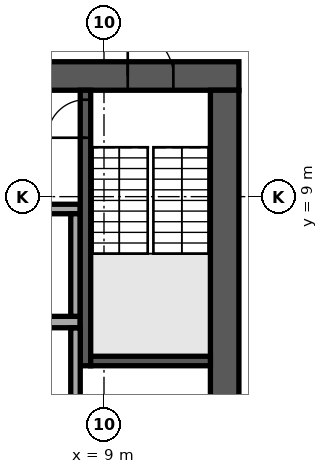
"""IFC4 building model, lengths in metres.
Left out: names, types, materials, properties, quantities, classifications, styles, units other than length and angle.
Written with IfcOpenShell. Run it as: python <this file> out.ifc"""

import sys

from ifc_helpers import new_model, si_unit, direction, frame, frame_2d, origin, place, context, subcontext, project, spatial, rectangle, extrude, element, fill, save


model = new_model("IFC4")
c1 = context("Model", 3, precision=1e-05, world=origin(), true_north=direction((0.0, 1.0)))
c2 = subcontext(c1, "Body", "Model", "MODEL_VIEW")
j1 = project(units=[si_unit("LENGTHUNIT", "METRE"), si_unit("PLANEANGLEUNIT", "RADIAN")], contexts=[c1])
p1 = place(None, origin())
s1 = spatial("IfcSite", under=j1, at=p1, CompositionType="ELEMENT")
p2 = place(p1, origin())
s2 = spatial("IfcBuilding", under=s1, at=p2, CompositionType="ELEMENT")
p3 = place(p2, frame((0.0, 0.0, 246.9)))
s3 = spatial("IfcBuildingStorey", under=s2, at=p3, CompositionType="ELEMENT", Elevation=246.9)
p4 = place(p3, frame((-12.55, 12.175, 0.0), z_axis=(0.0, 0.0, 1.0), x_axis=(1.0, 0.0, 0.0)))
e1 = element("IfcWall", 1, at=p4, inside=s3, PredefinedType="SHEAR", context=c2, shape_type="SweptSolid", body=[
    extrude(rectangle(XDim=25.1, YDim=0.75, at=frame_2d((12.55, 0.0))), origin(), (0.0, 0.0, 1.0), 3.64),
])
p5 = place(p4, frame((11.35, 0.0, 0.0)))
e2 = element("IfcOpeningElement", 2, at=p5, cuts=e1, PredefinedType="OPENING", context=c2, shape_type="SweptSolid", body=[
    extrude(rectangle(XDim=2.4, YDim=2.4, at=frame_2d((1.2, 1.2))), frame((0.0, 0.385, 0.0), z_axis=(0.0, -1.0, 0.0), x_axis=(1.0, 0.0, 0.0)), (0.0, 0.0, 1.0), 0.77),
])
p6 = place(p4, frame((22.175, 0.0, 0.0)))
e3 = element("IfcOpeningElement", 3, at=p6, cuts=e1, PredefinedType="OPENING", context=c2, shape_type="SweptSolid", body=[
    extrude(rectangle(XDim=1.2, YDim=2.1, at=frame_2d((0.6, 1.05))), frame((0.0, 0.385, 0.0), z_axis=(0.0, -1.0, 0.0), x_axis=(1.0, 0.0, 0.0)), (0.0, 0.0, 1.0), 0.77),
])
p7 = place(p4, frame((1.15, 0.0, 0.0)))
e4 = element("IfcOpeningElement", 4, at=p7, cuts=e1, PredefinedType="OPENING", context=c2, shape_type="SweptSolid", body=[
    extrude(rectangle(XDim=1.0, YDim=2.1, at=frame_2d((0.5, 1.05))), frame((0.0, 0.385, 0.0), z_axis=(0.0, -1.0, 0.0), x_axis=(1.0, 0.0, 0.0)), (0.0, 0.0, 1.0), 0.77),
])
p8 = place(p3, frame((12.175, -11.8, 0.0), z_axis=(0.0, 0.0, 1.0), x_axis=(0.0, 1.0, 0.0)))
e5 = element("IfcWall", 5, at=p8, inside=s3, PredefinedType="SHEAR", context=c2, shape_type="SweptSolid", body=[
    extrude(rectangle(XDim=23.6, YDim=0.75, at=frame_2d((11.8, 0.0))), origin(), (0.0, 0.0, 1.0), 3.64),
])
p9 = place(p8, frame((10.6, 0.0, 0.0)))
e6 = element("IfcOpeningElement", 6, at=p9, cuts=e5, PredefinedType="OPENING", context=c2, shape_type="SweptSolid", body=[
    extrude(rectangle(XDim=2.4, YDim=2.4, at=frame_2d((1.2, 1.2))), frame((0.0, 0.385, 0.0), z_axis=(0.0, -1.0, 0.0), x_axis=(1.0, 0.0, 0.0)), (0.0, 0.0, 1.0), 0.77),
])
p10 = place(p3, frame((-8.375, 5.7, 0.0), z_axis=(0.0, 0.0, 1.0), x_axis=(1.0, 0.0, 0.0)))
e7 = element("IfcWall", 7, at=p10, inside=s3, PredefinedType="SOLIDWALL", context=c2, shape_type="SweptSolid", body=[
    extrude(rectangle(XDim=16.75, YDim=0.3, at=frame_2d((8.375, 0.0))), origin(), (0.0, 0.0, 1.0), 3.64),
])
p11 = place(p3, frame((-8.375, 8.675, 0.0), z_axis=(0.0, 0.0, 1.0), x_axis=(1.0, 0.0, 0.0)))
e8 = element("IfcWall", 8, at=p11, inside=s3, PredefinedType="SOLIDWALL", context=c2, shape_type="SweptSolid", body=[
    extrude(rectangle(XDim=16.75, YDim=0.25, at=frame_2d((8.375, 0.0))), origin(), (0.0, 0.0, 1.0), 3.64),
])
p12 = place(p11, frame((0.9, 0.0, 0.0)))
e9 = element("IfcOpeningElement", 9, at=p12, cuts=e8, PredefinedType="OPENING", context=c2, shape_type="SweptSolid", body=[
    extrude(rectangle(XDim=1.2, YDim=2.1, at=frame_2d((0.6, 1.05))), frame((0.0, 0.135, 0.0), z_axis=(0.0, -1.0, 0.0), x_axis=(1.0, 0.0, 0.0)), (0.0, 0.0, 1.0), 0.27),
])
p13 = place(p11, frame((3.65, 0.0, 0.0)))
e10 = element("IfcOpeningElement", 10, at=p13, cuts=e8, PredefinedType="OPENING", context=c2, shape_type="SweptSolid", body=[
    extrude(rectangle(XDim=1.2, YDim=2.1, at=frame_2d((0.6, 1.05))), frame((0.0, 0.135, 0.0), z_axis=(0.0, -1.0, 0.0), x_axis=(1.0, 0.0, 0.0)), (0.0, 0.0, 1.0), 0.27),
])
p14 = place(p11, frame((6.4, 0.0, 0.0)))
e11 = element("IfcOpeningElement", 11, at=p14, cuts=e8, PredefinedType="OPENING", context=c2, shape_type="SweptSolid", body=[
    extrude(rectangle(XDim=1.2, YDim=2.1, at=frame_2d((0.6, 1.05))), frame((0.0, 0.135, 0.0), z_axis=(0.0, -1.0, 0.0), x_axis=(1.0, 0.0, 0.0)), (0.0, 0.0, 1.0), 0.27),
])
p15 = place(p11, frame((9.15, 0.0, 0.0)))
e12 = element("IfcOpeningElement", 12, at=p15, cuts=e8, PredefinedType="OPENING", context=c2, shape_type="SweptSolid", body=[
    extrude(rectangle(XDim=1.2, YDim=2.1, at=frame_2d((0.6, 1.05))), frame((0.0, 0.135, 0.0), z_axis=(0.0, -1.0, 0.0), x_axis=(1.0, 0.0, 0.0)), (0.0, 0.0, 1.0), 0.27),
])
p16 = place(p11, frame((11.9, 0.0, 0.0)))
e13 = element("IfcOpeningElement", 13, at=p16, cuts=e8, PredefinedType="OPENING", context=c2, shape_type="SweptSolid", body=[
    extrude(rectangle(XDim=1.2, YDim=2.1, at=frame_2d((0.6, 1.05))), frame((0.0, 0.135, 0.0), z_axis=(0.0, -1.0, 0.0), x_axis=(1.0, 0.0, 0.0)), (0.0, 0.0, 1.0), 0.27),
])
p17 = place(p11, frame((14.65, 0.0, 0.0)))
e14 = element("IfcOpeningElement", 14, at=p17, cuts=e8, PredefinedType="OPENING", context=c2, shape_type="SweptSolid", body=[
    extrude(rectangle(XDim=1.2, YDim=2.1, at=frame_2d((0.6, 1.05))), frame((0.0, 0.135, 0.0), z_axis=(0.0, -1.0, 0.0), x_axis=(1.0, 0.0, 0.0)), (0.0, 0.0, 1.0), 0.27),
])
p18 = place(p3, frame((8.25, 5.85, 0.0), z_axis=(0.0, 0.0, 1.0), x_axis=(0.0, 1.0, 0.0)))
e15 = element("IfcWall", 15, at=p18, inside=s3, PredefinedType="SOLIDWALL", context=c2, shape_type="SweptSolid", body=[
    extrude(rectangle(XDim=2.7, YDim=0.25, at=frame_2d((1.35, 0.0))), origin(), (0.0, 0.0, 1.0), 3.64),
])
p19 = place(p3, frame((8.512, 4.55, 0.0), z_axis=(0.0, 0.0, 1.0), x_axis=(0.0, 1.0, 0.0)))
e16 = element("IfcWall", 16, at=p19, inside=s3, PredefinedType="SOLIDWALL", context=c2, shape_type="SweptSolid", body=[
    extrude(rectangle(XDim=7.25, YDim=0.275, at=frame_2d((3.625, 0.0))), origin(), (0.0, 0.0, 1.0), 3.64),
])
p20 = place(p19, frame((6.0, 0.0, 0.0)))
e17 = element("IfcOpeningElement", 17, at=p20, cuts=e16, PredefinedType="OPENING", context=c2, shape_type="SweptSolid", body=[
    extrude(rectangle(XDim=1.0, YDim=2.1, at=frame_2d((0.5, 1.05))), frame((0.0, 0.147, 0.0), z_axis=(0.0, -1.0, 0.0), x_axis=(1.0, 0.0, 0.0)), (0.0, 0.0, 1.0), 0.295),
])
p21 = place(p3, frame((8.65, 4.675, 0.0), z_axis=(0.0, 0.0, 1.0), x_axis=(1.0, 0.0, 0.0)))
e18 = element("IfcWall", 18, at=p21, inside=s3, PredefinedType="SOLIDWALL", context=c2, shape_type="SweptSolid", body=[
    extrude(rectangle(XDim=3.15, YDim=0.25, at=frame_2d((1.575, 0.0))), origin(), (0.0, 0.0, 1.0), 3.64),
])
p22 = place(p3, frame((8.25, 2.855, 0.0), z_axis=(0.0, 0.0, 1.0), x_axis=(0.0, 1.0, 0.0)))
e19 = element("IfcWall", 19, at=p22, inside=s3, PredefinedType="PARTITIONING", context=c2, shape_type="SweptSolid", body=[
    extrude(rectangle(XDim=2.69, YDim=0.25, at=frame_2d((1.345, 0.0))), origin(), (0.0, 0.0, 1.0), 3.64),
])
p23 = place(p3, frame((5.206, -33.362, 0.0), z_axis=(0.0, 0.0, 1.0), x_axis=(0.573577438409, 0.81915134264, 0.0)))
e20 = element("IfcWall", 20, at=p23, inside=s3, PredefinedType="STANDARD", context=c2, shape_type="SweptSolid", body=[
    extrude(rectangle(XDim=48.686, YDim=0.6, at=frame_2d((24.343, 0.0))), origin(), (0.0, 0.0, 1.0), 3.64),
])
p24 = place(p23, frame((1.213, 0.0, 0.9)))
e21 = element("IfcOpeningElement", 21, at=p24, cuts=e20, PredefinedType="OPENING", context=c2, shape_type="SweptSolid", body=[
    extrude(rectangle(XDim=2.0, YDim=2.1, at=frame_2d((1.0, 1.05))), frame((0.0, 0.31, 0.0), z_axis=(0.0, -1.0, 0.0), x_axis=(1.0, 0.0, 0.0)), (0.0, 0.0, 1.0), 0.62),
])
p25 = place(p23, frame((5.639, 0.0, 0.9)))
e22 = element("IfcOpeningElement", 22, at=p25, cuts=e20, PredefinedType="OPENING", context=c2, shape_type="SweptSolid", body=[
    extrude(rectangle(XDim=2.0, YDim=2.1, at=frame_2d((1.0, 1.05))), frame((0.0, 0.31, 0.0), z_axis=(0.0, -1.0, 0.0), x_axis=(1.0, 0.0, 0.0)), (0.0, 0.0, 1.0), 0.62),
])
p26 = place(p23, frame((10.065, 0.0, 0.9)))
e23 = element("IfcOpeningElement", 23, at=p26, cuts=e20, PredefinedType="OPENING", context=c2, shape_type="SweptSolid", body=[
    extrude(rectangle(XDim=2.0, YDim=2.1, at=frame_2d((1.0, 1.05))), frame((0.0, 0.31, 0.0), z_axis=(0.0, -1.0, 0.0), x_axis=(1.0, 0.0, 0.0)), (0.0, 0.0, 1.0), 0.62),
])
p27 = place(p23, frame((14.491, 0.0, 0.9)))
e24 = element("IfcOpeningElement", 24, at=p27, cuts=e20, PredefinedType="OPENING", context=c2, shape_type="SweptSolid", body=[
    extrude(rectangle(XDim=2.0, YDim=2.1, at=frame_2d((1.0, 1.05))), frame((0.0, 0.31, 0.0), z_axis=(0.0, -1.0, 0.0), x_axis=(1.0, 0.0, 0.0)), (0.0, 0.0, 1.0), 0.62),
])
p28 = place(p23, frame((18.917, 0.0, 0.9)))
e25 = element("IfcOpeningElement", 25, at=p28, cuts=e20, PredefinedType="OPENING", context=c2, shape_type="SweptSolid", body=[
    extrude(rectangle(XDim=2.0, YDim=2.1, at=frame_2d((1.0, 1.05))), frame((0.0, 0.31, 0.0), z_axis=(0.0, -1.0, 0.0), x_axis=(1.0, 0.0, 0.0)), (0.0, 0.0, 1.0), 0.62),
])
p29 = place(p23, frame((23.343, 0.0, 0.9)))
e26 = element("IfcOpeningElement", 26, at=p29, cuts=e20, PredefinedType="OPENING", context=c2, shape_type="SweptSolid", body=[
    extrude(rectangle(XDim=2.0, YDim=2.1, at=frame_2d((1.0, 1.05))), frame((0.0, 0.31, 0.0), z_axis=(0.0, -1.0, 0.0), x_axis=(1.0, 0.0, 0.0)), (0.0, 0.0, 1.0), 0.62),
])
p30 = place(p23, frame((27.769, 0.0, 0.9)))
e27 = element("IfcOpeningElement", 27, at=p30, cuts=e20, PredefinedType="OPENING", context=c2, shape_type="SweptSolid", body=[
    extrude(rectangle(XDim=2.0, YDim=2.1, at=frame_2d((1.0, 1.05))), frame((0.0, 0.31, 0.0), z_axis=(0.0, -1.0, 0.0), x_axis=(1.0, 0.0, 0.0)), (0.0, 0.0, 1.0), 0.62),
])
p31 = place(p23, frame((32.195, 0.0, 0.9)))
e28 = element("IfcOpeningElement", 28, at=p31, cuts=e20, PredefinedType="OPENING", context=c2, shape_type="SweptSolid", body=[
    extrude(rectangle(XDim=2.0, YDim=2.1, at=frame_2d((1.0, 1.05))), frame((0.0, 0.31, 0.0), z_axis=(0.0, -1.0, 0.0), x_axis=(1.0, 0.0, 0.0)), (0.0, 0.0, 1.0), 0.62),
])
p32 = place(p23, frame((36.621, 0.0, 0.9)))
e29 = element("IfcOpeningElement", 29, at=p32, cuts=e20, PredefinedType="OPENING", context=c2, shape_type="SweptSolid", body=[
    extrude(rectangle(XDim=2.0, YDim=2.1, at=frame_2d((1.0, 1.05))), frame((0.0, 0.31, 0.0), z_axis=(0.0, -1.0, 0.0), x_axis=(1.0, 0.0, 0.0)), (0.0, 0.0, 1.0), 0.62),
])
p33 = place(p23, frame((41.047, 0.0, 0.9)))
e30 = element("IfcOpeningElement", 30, at=p33, cuts=e20, PredefinedType="OPENING", context=c2, shape_type="SweptSolid", body=[
    extrude(rectangle(XDim=2.0, YDim=2.1, at=frame_2d((1.0, 1.05))), frame((0.0, 0.31, 0.0), z_axis=(0.0, -1.0, 0.0), x_axis=(1.0, 0.0, 0.0)), (0.0, 0.0, 1.0), 0.62),
])
p34 = place(p23, frame((45.473, 0.0, 0.9)))
e31 = element("IfcOpeningElement", 31, at=p34, cuts=e20, PredefinedType="OPENING", context=c2, shape_type="SweptSolid", body=[
    extrude(rectangle(XDim=2.0, YDim=2.1, at=frame_2d((1.0, 1.05))), frame((0.0, 0.31, 0.0), z_axis=(0.0, -1.0, 0.0), x_axis=(1.0, 0.0, 0.0)), (0.0, 0.0, 1.0), 0.62),
])
p35 = place(p3, frame((-1.89, 27.226, 0.0), z_axis=(0.0, 0.0, 1.0), x_axis=(0.819163235761, -0.573560452941, 0.0)))
e32 = element("IfcWall", 32, at=p35, inside=s3, PredefinedType="PARTITIONING", context=c2, shape_type="SweptSolid", body=[
    extrude(rectangle(XDim=34.403, YDim=0.15, at=frame_2d((17.202, 0.0))), origin(), (0.0, 0.0, 1.0), 3.24),
])
p36 = place(p35, frame((7.427, 0.0, 0.0)))
e33 = element("IfcOpeningElement", 33, at=p36, cuts=e32, PredefinedType="OPENING", context=c2, shape_type="SweptSolid", body=[
    extrude(rectangle(XDim=1.0, YDim=2.1, at=frame_2d((0.5, 1.05))), frame((0.0, 0.085, 0.0), z_axis=(0.0, -1.0, 0.0), x_axis=(1.0, 0.0, 0.0)), (0.0, 0.0, 1.0), 0.17),
])
p37 = place(p35, frame((15.173, 0.0, 0.0)))
e34 = element("IfcOpeningElement", 34, at=p37, cuts=e32, PredefinedType="OPENING", context=c2, shape_type="SweptSolid", body=[
    extrude(rectangle(XDim=1.0, YDim=2.1, at=frame_2d((0.5, 1.05))), frame((0.0, 0.085, 0.0), z_axis=(0.0, -1.0, 0.0), x_axis=(1.0, 0.0, 0.0)), (0.0, 0.0, 1.0), 0.17),
])
p38 = place(p35, frame((19.273, 0.0, 0.0)))
e35 = element("IfcOpeningElement", 35, at=p38, cuts=e32, PredefinedType="OPENING", context=c2, shape_type="SweptSolid", body=[
    extrude(rectangle(XDim=1.0, YDim=2.1, at=frame_2d((0.5, 1.05))), frame((0.0, 0.085, 0.0), z_axis=(0.0, -1.0, 0.0), x_axis=(1.0, 0.0, 0.0)), (0.0, 0.0, 1.0), 0.17),
])
p39 = place(p6, origin())
e36 = element("IfcDoor", 36, at=p39, inside=s3, OperationType="SINGLE_SWING_LEFT", PredefinedType="DOOR", context=c2, shape_type="SweptSolid", body=[
    extrude(rectangle(XDim=1.2, YDim=2.1, at=frame_2d((0.6, 1.05))), frame((0.0, 0.025, 0.0), z_axis=(0.0, -1.0, 0.0), x_axis=(1.0, 0.0, 0.0)), (0.0, 0.0, 1.0), 0.05),
])
fill(e3, e36)
p40 = place(p20, origin())
e37 = element("IfcDoor", 37, at=p40, inside=s3, OperationType="SINGLE_SWING_LEFT", PredefinedType="DOOR", context=c2, shape_type="SweptSolid", body=[
    extrude(rectangle(XDim=1.0, YDim=2.1, at=frame_2d((0.5, 1.05))), frame((0.0, 0.025, 0.0), z_axis=(0.0, -1.0, 0.0), x_axis=(1.0, 0.0, 0.0)), (0.0, 0.0, 1.0), 0.05),
])
fill(e17, e37)
save(model, sys.argv[1])
